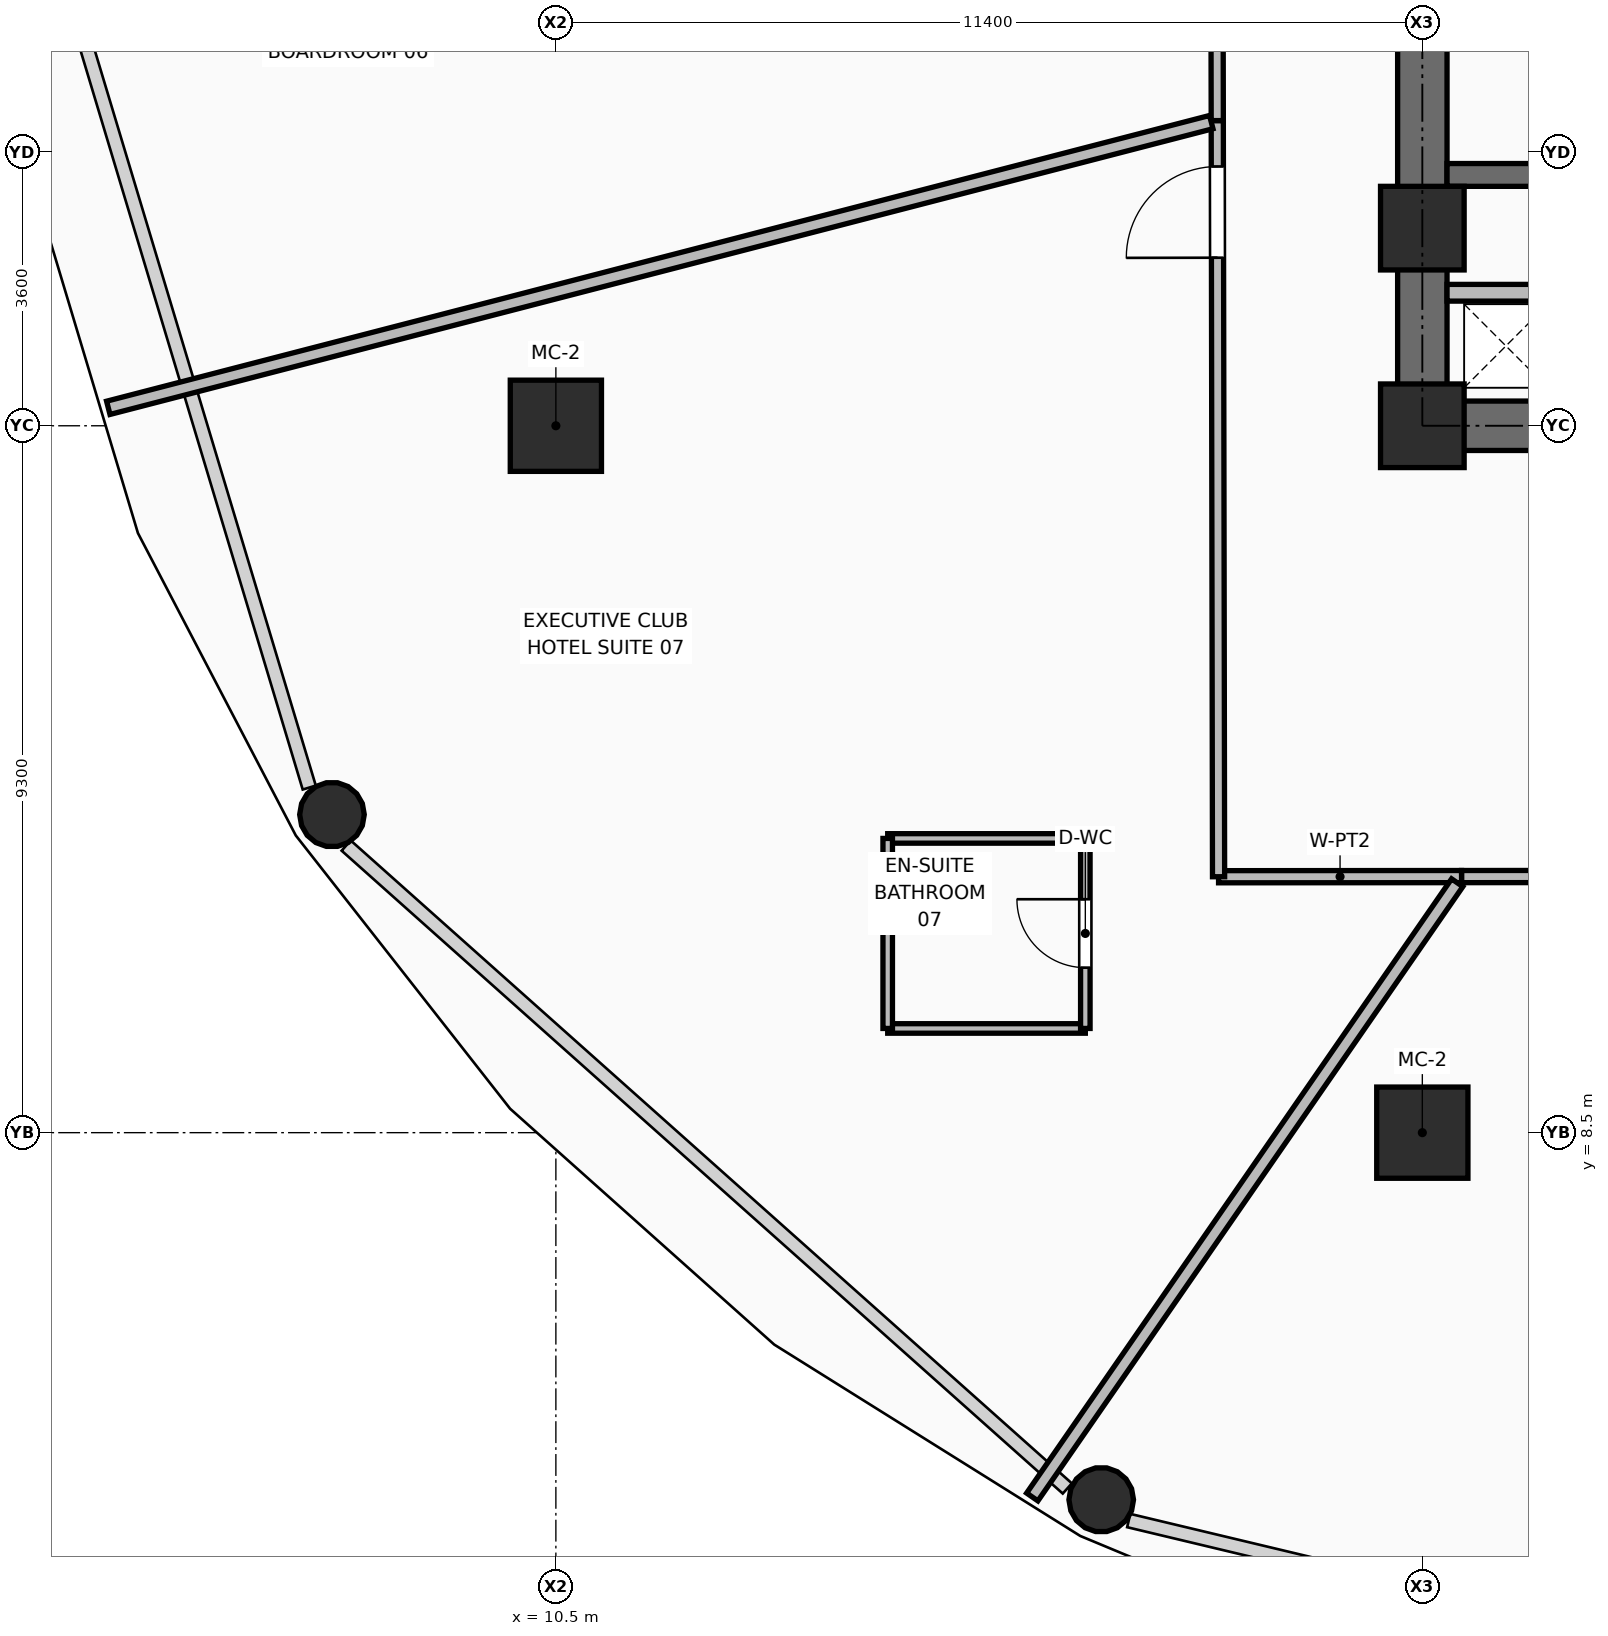
"""IFC4 building model, lengths in metres.
Left out: names, types, materials, properties, quantities, classifications, styles, units other than length and angle.
Written with IfcOpenShell. Run it as: python <this file> out.ifc"""

import sys

from ifc_helpers import new_model, si_unit, direction, frame, frame_2d, origin, origin_2d, place, context, subcontext, project, spatial, rectangle, hollow_rectangle, hollow_circle, extrude, element, fill, save


model = new_model("IFC4")
c1 = context("Model", 3, precision=1e-05, world=origin(), true_north=direction((0.0, 1.0)))
c2 = subcontext(c1, "Body", "Model", "MODEL_VIEW")
j1 = project(units=[si_unit("LENGTHUNIT", "METRE"), si_unit("PLANEANGLEUNIT", "RADIAN")], contexts=[c1])
p1 = place(None, origin())
s1 = spatial("IfcSite", under=j1, at=p1, CompositionType="ELEMENT")
p2 = place(p1, origin())
s2 = spatial("IfcBuilding", under=s1, at=p2, CompositionType="ELEMENT")
p3 = place(p2, frame((0.0, 0.0, 75.75)))
s3 = spatial("IfcBuildingStorey", under=s2, at=p3, CompositionType="ELEMENT", Elevation=75.75)
for number, where, z_axis, x_axis in (
    (1, (21.9, 17.8, 0.0), (0.0, 0.0, 1.0), (1.0, 0.0, 0.0)),
    (2, (21.9, 20.4, 0.0), (0.0, 0.0, 1.0), (1.0, 0.0, 0.0)),
):
    element("IfcColumn", number, at=place(p3, frame(where, z_axis=z_axis, x_axis=x_axis)), inside=s3, PredefinedType="COLUMN", context=c2, shape_type="SweptSolid", body=[
        extrude(rectangle(XDim=1.1, YDim=1.1, at=origin_2d()), origin(), (0.0, 0.0, 1.0), 3.75),
    ])
for number, where, z_axis, x_axis in (
    (3, (21.9, 8.5, 0.0), (0.0, 0.0, 1.0), (1.0, 0.0, 0.0)),
    (4, (10.5, 17.8, 0.0), (0.0, 0.0, 1.0), (1.0, 0.0, 0.0)),
):
    element("IfcColumn", number, at=place(p3, frame(where, z_axis=z_axis, x_axis=x_axis)), inside=s3, PredefinedType="COLUMN", context=c2, shape_type="SweptSolid", body=[
        extrude(hollow_rectangle(XDim=1.2, YDim=1.2, WallThickness=0.045, at=origin_2d()), origin(), (0.0, 0.0, 1.0), 3.75),
    ])
p4 = place(p3, frame((7.554, 12.685, 0.0), z_axis=(0.03641885619, 0.018721888548, 0.999161227132), x_axis=(-0.457197196227, 0.889365348865, 0.0)))
e5 = element("IfcColumn", 5, at=p4, inside=s3, PredefinedType="COLUMN", context=c2, shape_type="SweptSolid", body=[
    extrude(hollow_circle(Radius=0.425, WallThickness=0.04, at=origin_2d()), origin(), (0.0, 0.0, 1.0), 3.573),
])
p5 = place(p3, frame((17.675, 3.671, 0.0), z_axis=(0.020978592197, 0.032527068032, 0.999250663505), x_axis=(-0.840374471714, 0.542006224404, 0.0)))
e6 = element("IfcColumn", 6, at=p5, inside=s3, PredefinedType="COLUMN", context=c2, shape_type="SweptSolid", body=[
    extrude(hollow_circle(Radius=0.425, WallThickness=0.04, at=origin_2d()), origin(), (0.0, 0.0, 1.0), 3.573),
])
p6 = place(p3, frame((21.575, 17.8, 0.0), z_axis=(0.0, 0.0, 1.0), x_axis=(1.0, 0.0, 0.0)))
e7 = element("IfcWall", 7, at=p6, inside=s3, PredefinedType="SHEAR", context=c2, shape_type="SweptSolid", body=[
    extrude(rectangle(XDim=2.175, YDim=0.65, at=frame_2d((1.087, 0.0))), origin(), (0.0, 0.0, 1.0), 3.57),
])
p7 = place(p3, frame((21.9, 18.125, 0.0), z_axis=(0.0, 0.0, 1.0), x_axis=(0.0, 1.0, 0.0)))
e8 = element("IfcWall", 8, at=p7, inside=s3, PredefinedType="SHEAR", context=c2, shape_type="SweptSolid", body=[
    extrude(rectangle(XDim=14.0, YDim=0.65, at=frame_2d((7.0, 0.0))), origin(), (0.0, 0.0, 1.0), 3.57),
])
p8 = place(p3, frame((22.225, 21.1, 0.0), z_axis=(0.0, 0.0, 1.0), x_axis=(1.0, 0.0, 0.0)))
e9 = element("IfcWall", 9, at=p8, inside=s3, PredefinedType="SHEAR", context=c2, shape_type="SweptSolid", body=[
    extrude(rectangle(XDim=3.515, YDim=0.3, at=frame_2d((1.757, 0.0))), origin(), (0.0, 0.0, 1.0), 3.57),
])
p9 = place(p8, frame((1.995, 0.0, 0.0)))
e10 = element("IfcOpeningElement", 10, at=p9, cuts=e9, PredefinedType="OPENING", context=c2, shape_type="SweptSolid", body=[
    extrude(rectangle(XDim=1.05, YDim=2.1, at=frame_2d((0.525, 1.05))), frame((0.0, 0.16, 0.0), z_axis=(0.0, -1.0, 0.0), x_axis=(1.0, 0.0, 0.0)), (0.0, 0.0, 1.0), 0.32),
])
p10 = place(p3, frame((22.225, 19.55, 0.0), z_axis=(0.0, 0.0, 1.0), x_axis=(1.0, 0.0, 0.0)))
e11 = element("IfcWall", 11, at=p10, inside=s3, PredefinedType="PARTITIONING", context=c2, shape_type="SweptSolid", body=[
    extrude(rectangle(XDim=1.565, YDim=0.22, at=frame_2d((0.782, 0.0))), origin(), (0.0, 0.0, 1.0), 2.595),
])
p11 = place(p3, frame((34.062, 11.877, 0.0), z_axis=(0.0, 0.0, 1.0), x_axis=(-0.99999976071, -0.000691794728, 0.0)))
e12 = element("IfcWall", 12, at=p11, inside=s3, PredefinedType="PARTITIONING", context=c2, shape_type="SweptSolid", body=[
    extrude(rectangle(XDim=11.646, YDim=0.16, at=frame_2d((5.823, 0.0))), origin(), (0.0, 0.0, 1.0), 2.928),
])
p12 = place(p11, frame((5.223, 0.0, 0.0)))
e13 = element("IfcOpeningElement", 13, at=p12, cuts=e12, PredefinedType="OPENING", context=c2, shape_type="SweptSolid", body=[
    extrude(rectangle(XDim=1.2, YDim=2.1, at=frame_2d((0.6, 1.05))), frame((0.0, 0.09, 0.0), z_axis=(0.0, -1.0, 0.0), x_axis=(1.0, 0.0, 0.0)), (0.0, 0.0, 1.0), 0.18),
])
p13 = place(p3, frame((22.416, 11.869, 0.0), z_axis=(0.0, 0.0, 1.0), x_axis=(-0.999999813388, -0.000610920085, 0.0)))
e14 = element("IfcWall", 14, at=p13, inside=s3, PredefinedType="PARTITIONING", context=c2, shape_type="SweptSolid", body=[
    extrude(rectangle(XDim=3.197, YDim=0.16, at=frame_2d((1.599, 0.0))), origin(), (0.0, 0.0, 1.0), 2.928),
])
p14 = place(p3, frame((19.219, 11.867, 0.0), z_axis=(0.0, 0.0, 1.0), x_axis=(-0.001717915349, 0.999998524382, 0.0)))
e15 = element("IfcWall", 15, at=p14, inside=s3, PredefinedType="PARTITIONING", context=c2, shape_type="SweptSolid", body=[
    extrude(rectangle(XDim=9.948, YDim=0.16, at=frame_2d((4.974, 0.0))), origin(), (0.0, 0.0, 1.0), 2.928),
])
p15 = place(p14, frame((8.144, 0.0, 0.0)))
e16 = element("IfcOpeningElement", 16, at=p15, cuts=e15, PredefinedType="OPENING", context=c2, shape_type="SweptSolid", body=[
    extrude(rectangle(XDim=1.2, YDim=2.1, at=frame_2d((0.6, 1.05))), frame((0.0, 0.09, 0.0), z_axis=(0.0, -1.0, 0.0), x_axis=(1.0, 0.0, 0.0)), (0.0, 0.0, 1.0), 0.18),
])
p16 = place(p3, frame((19.202, 21.815, 0.0), z_axis=(0.0, 0.0, 1.0), x_axis=(-0.001912042394, 0.999998172045, 0.0)))
e17 = element("IfcWall", 17, at=p16, inside=s3, PredefinedType="PARTITIONING", context=c2, shape_type="SweptSolid", body=[
    extrude(rectangle(XDim=2.043, YDim=0.16, at=frame_2d((1.021, 0.0))), origin(), (0.0, 0.0, 1.0), 3.55),
])
p17 = place(p3, frame((19.123, 21.795, 0.0), z_axis=(0.0, 0.0, 1.0), x_axis=(-0.968050799349, -0.250754162238, 0.0)))
e18 = element("IfcWall", 18, at=p17, inside=s3, PredefinedType="PARTITIONING", context=c2, shape_type="SweptSolid", body=[
    extrude(rectangle(XDim=14.991, YDim=0.18, at=frame_2d((7.496, 0.0))), origin(), (0.0, 0.0, 1.0), 2.775),
])
p18 = place(p3, frame((22.359, 11.788, 0.0), z_axis=(0.0, 0.0, 1.0), x_axis=(-0.568951562239, -0.822371035376, 0.0)))
e19 = element("IfcWall", 19, at=p18, inside=s3, PredefinedType="PARTITIONING", context=c2, shape_type="SweptSolid", body=[
    extrude(rectangle(XDim=9.826, YDim=0.18, at=frame_2d((4.913, 0.0))), origin(), (0.0, 0.0, 1.0), 2.775),
])
for number, where, z_axis, x_axis in (
    (20, (14.866, 9.871, 0.0), (0.0, 0.0, 1.0), (1.0, 0.0, 0.0)),
    (21, (14.866, 12.371, 0.0), (0.0, 0.0, 1.0), (1.0, 0.0, 0.0)),
):
    element("IfcWall", number, at=place(p3, frame(where, z_axis=z_axis, x_axis=x_axis)), inside=s3, PredefinedType="PARTITIONING", context=c2, shape_type="SweptSolid", body=[
        extrude(rectangle(XDim=2.6, YDim=0.125, at=frame_2d((1.3, 0.0))), origin(), (0.0, 0.0, 1.0), 3.55),
    ])
p19 = place(p3, frame((14.866, 9.871, 0.0), z_axis=(0.0, 0.0, 1.0), x_axis=(0.0, 1.0, 0.0)))
e22 = element("IfcWall", 22, at=p19, inside=s3, PredefinedType="PARTITIONING", context=c2, shape_type="SweptSolid", body=[
    extrude(rectangle(XDim=2.5, YDim=0.125, at=frame_2d((1.25, 0.0))), origin(), (0.0, 0.0, 1.0), 3.55),
])
p20 = place(p3, frame((17.466, 9.871, 0.0), z_axis=(0.0, 0.0, 1.0), x_axis=(0.0, 1.0, 0.0)))
e23 = element("IfcWall", 23, at=p20, inside=s3, PredefinedType="PARTITIONING", context=c2, shape_type="SweptSolid", body=[
    extrude(rectangle(XDim=2.5, YDim=0.125, at=frame_2d((1.25, 0.0))), origin(), (0.0, 0.0, 1.0), 3.55),
])
p21 = place(p20, frame((0.8, 0.0, 0.0)))
e24 = element("IfcOpeningElement", 24, at=p21, cuts=e23, PredefinedType="OPENING", context=c2, shape_type="SweptSolid", body=[
    extrude(rectangle(XDim=0.9, YDim=2.1, at=frame_2d((0.45, 1.05))), frame((0.0, 0.073, 0.0), z_axis=(0.0, -1.0, 0.0), x_axis=(1.0, 0.0, 0.0)), (0.0, 0.0, 1.0), 0.145),
])
p22 = place(p21, origin())
e25 = element("IfcDoor", 25, at=p22, inside=s3, OperationType="SINGLE_SWING_RIGHT", PredefinedType="DOOR", context=c2, shape_type="SweptSolid", body=[
    extrude(rectangle(XDim=0.9, YDim=2.1, at=frame_2d((0.45, 1.05))), frame((0.0, 0.025, 0.0), z_axis=(0.0, -1.0, 0.0), x_axis=(1.0, 0.0, 0.0)), (0.0, 0.0, 1.0), 0.05),
])
fill(e24, e25)
p23 = place(p15, origin())
e26 = element("IfcDoor", 26, at=p23, inside=s3, OperationType="SINGLE_SWING_LEFT", PredefinedType="DOOR", context=c2, shape_type="SweptSolid", body=[
    extrude(rectangle(XDim=1.2, YDim=2.1, at=frame_2d((0.6, 1.05))), frame((0.0, 0.025, 0.0), z_axis=(0.0, -1.0, 0.0), x_axis=(1.0, 0.0, 0.0)), (0.0, 0.0, 1.0), 0.05),
])
fill(e16, e26)
save(model, sys.argv[1])
